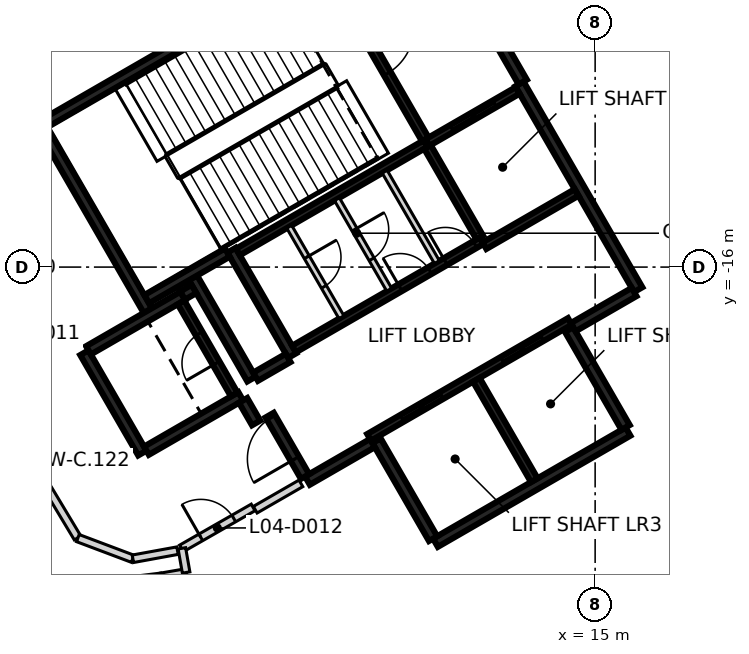
"""IFC4 building model, lengths in metres.
Left out: names, types, materials, properties, quantities, classifications, styles, units other than length and angle.
Written with IfcOpenShell. Run it as: python <this file> out.ifc"""

import sys

from ifc_helpers import new_model, si_unit, direction, frame, frame_2d, origin, place, context, subcontext, project, spatial, rectangle, extrude, element, fill, save


model = new_model("IFC4")
c1 = context("Model", 3, precision=1e-05, world=origin(), true_north=direction((0.0, 1.0)))
c2 = subcontext(c1, "Body", "Model", "MODEL_VIEW")
j1 = project(units=[si_unit("LENGTHUNIT", "METRE"), si_unit("PLANEANGLEUNIT", "RADIAN")], contexts=[c1])
p1 = place(None, origin())
s1 = spatial("IfcSite", under=j1, at=p1, CompositionType="ELEMENT")
p2 = place(p1, origin())
s2 = spatial("IfcBuilding", under=s1, at=p2, CompositionType="ELEMENT")
p3 = place(p2, frame((0.0, 0.0, 24.5)))
s3 = spatial("IfcBuildingStorey", under=s2, at=p3, CompositionType="ELEMENT", Elevation=24.5)
p4 = place(p3, frame((0.417, -12.273, 0.0), z_axis=(0.0, 0.0, 1.0), x_axis=(0.866021906294, 0.500006057782, 0.0)))
e1 = element("IfcWall", 1, at=p4, inside=s3, PredefinedType="SHEAR", context=c2, shape_type="SweptSolid", body=[
    extrude(rectangle(XDim=11.55, YDim=0.25, at=frame_2d((5.775, 0.0))), origin(), (0.0, 0.0, 1.0), 4.6),
])
p5 = place(p4, frame((10.025, 0.0, 0.0)))
e2 = element("IfcOpeningElement", 2, at=p5, cuts=e1, PredefinedType="OPENING", context=c2, shape_type="SweptSolid", body=[
    extrude(rectangle(XDim=1.2, YDim=2.1, at=frame_2d((0.6, 1.05))), frame((0.0, 0.135, 0.0), z_axis=(0.0, -1.0, 0.0), x_axis=(1.0, 0.0, 0.0)), (0.0, 0.0, 1.0), 0.27),
])
p6 = place(p4, frame((8.725, 0.0, 0.0)))
e3 = element("IfcOpeningElement", 3, at=p6, cuts=e1, PredefinedType="OPENING", context=c2, shape_type="SweptSolid", body=[
    extrude(rectangle(XDim=1.2, YDim=2.1, at=frame_2d((0.6, 1.05))), frame((0.0, 0.135, 0.0), z_axis=(0.0, -1.0, 0.0), x_axis=(1.0, 0.0, 0.0)), (0.0, 0.0, 1.0), 0.27),
])
p7 = place(p3, frame((13.008, -11.181, 0.0), z_axis=(0.0, 0.0, 1.0), x_axis=(0.500004234368, -0.866022959057, 0.0)))
e4 = element("IfcWall", 4, at=p7, inside=s3, PredefinedType="SHEAR", context=c2, shape_type="SweptSolid", body=[
    extrude(rectangle(XDim=6.25, YDim=0.25, at=frame_2d((3.125, 0.0))), origin(), (0.0, 0.0, 1.0), 4.6),
])
p8 = place(p3, frame((15.865, -20.328, 0.0), z_axis=(0.0, 0.0, 1.0), x_axis=(-0.86602852612, -0.499994591916, 0.0)))
e5 = element("IfcWall", 5, at=p8, inside=s3, PredefinedType="SHEAR", context=c2, shape_type="SweptSolid", body=[
    extrude(rectangle(XDim=5.85, YDim=0.25, at=frame_2d((2.925, 0.0))), origin(), (0.0, 0.0, 1.0), 4.6),
])
p9 = place(p3, frame((3.235, -17.153, 0.0), z_axis=(0.0, 0.0, 1.0), x_axis=(-0.500008851346, 0.866020293397, 0.0)))
e6 = element("IfcWall", 6, at=p9, inside=s3, PredefinedType="SHEAR", context=c2, shape_type="SweptSolid", body=[
    extrude(rectangle(XDim=5.51, YDim=0.25, at=frame_2d((2.755, 0.0))), origin(), (0.0, 0.0, 1.0), 4.6),
])
p10 = place(p3, frame((10.483, -6.606, 0.0), z_axis=(0.0, 0.0, 1.0), x_axis=(0.49999885962, -0.866026062182, 0.0)))
e7 = element("IfcWall", 7, at=p10, inside=s3, PredefinedType="SHEAR", context=c2, shape_type="SweptSolid", body=[
    extrude(rectangle(XDim=5.225, YDim=0.25, at=frame_2d((2.612, 0.0))), origin(), (0.0, 0.0, 1.0), 4.6),
])
p11 = place(p10, frame((1.95, 0.0, 0.0)))
e8 = element("IfcOpeningElement", 8, at=p11, cuts=e7, PredefinedType="OPENING", context=c2, shape_type="SweptSolid", body=[
    extrude(rectangle(XDim=1.2, YDim=2.1, at=frame_2d((0.6, 1.05))), frame((0.0, 0.135, 0.0), z_axis=(0.0, -1.0, 0.0), x_axis=(1.0, 0.0, 0.0)), (0.0, 0.0, 1.0), 0.27),
])
p12 = place(p3, frame((7.031, -18.327, 0.0), z_axis=(0.0, 0.0, 1.0), x_axis=(-0.499971222258, 0.866042017984, 0.0)))
e9 = element("IfcWall", 9, at=p12, inside=s3, PredefinedType="SHEAR", context=c2, shape_type="SweptSolid", body=[
    extrude(rectangle(XDim=3.2, YDim=0.25, at=frame_2d((1.6, 0.0))), origin(), (0.0, 0.0, 1.0), 4.6),
])
for number, where, z_axis, x_axis in (
    (10, (14.315, -17.644, 0.0), (0.0, 0.0, 1.0), (0.5, -0.866, 0.0)),
    (11, (10.736, -23.145, 0.0), (0.0, 0.0, 1.0), (-0.5, 0.866, 0.0)),
):
    element("IfcWall", number, at=place(p3, frame(where, z_axis=z_axis, x_axis=x_axis)), inside=s3, PredefinedType="SHEAR", context=c2, shape_type="SweptSolid", body=[
        extrude(rectangle(XDim=2.974, YDim=0.25, at=frame_2d((1.487, 0.0))), origin(), (0.0, 0.0, 1.0), 4.6),
    ])
p13 = place(p3, frame((3.085, -20.894, 0.0), z_axis=(0.0, 0.0, 1.0), x_axis=(-0.499978833458, 0.866037623948, 0.0)))
e12 = element("IfcWall", 12, at=p13, inside=s3, PredefinedType="SHEAR", context=c2, shape_type="SweptSolid", body=[
    extrude(rectangle(XDim=3.05, YDim=0.25, at=frame_2d((1.525, 0.0))), origin(), (0.0, 0.0, 1.0), 4.6),
])
p14 = place(p3, frame((1.669, -18.19, 0.0), z_axis=(0.0, 0.0, 1.0), x_axis=(0.866042235819, 0.499970844928, 0.0)))
e13 = element("IfcWall", 13, at=p14, inside=s3, PredefinedType="SHEAR", context=c2, shape_type="SweptSolid", body=[
    extrude(rectangle(XDim=2.865, YDim=0.25, at=frame_2d((1.432, 0.0))), origin(), (0.0, 0.0, 1.0), 4.6),
])
p15 = place(p3, frame((5.675, -19.399, 0.0), z_axis=(0.0, 0.0, 1.0), x_axis=(-0.866026637627, -0.499997862916, 0.0)))
e14 = element("IfcWall", 14, at=p15, inside=s3, PredefinedType="SHEAR", context=c2, shape_type="SweptSolid", body=[
    extrude(rectangle(XDim=2.865, YDim=0.25, at=frame_2d((1.432, 0.0))), origin(), (0.0, 0.0, 1.0), 4.6),
])
p16 = place(p3, frame((4.414, -16.276, 0.0), z_axis=(0.0, 0.0, 1.0), x_axis=(0.500003324108, -0.866023484601, 0.0)))
e15 = element("IfcWall", 15, at=p16, inside=s3, PredefinedType="SHEAR", context=c2, shape_type="SweptSolid", body=[
    extrude(rectangle(XDim=3.085, YDim=0.25, at=frame_2d((1.542, 0.0))), origin(), (0.0, 0.0, 1.0), 4.6),
])
p17 = place(p3, frame((5.322, -15.619, 0.0), z_axis=(0.0, 0.0, 1.0), x_axis=(-0.866026229868, -0.499998569178, 0.0)))
e16 = element("IfcWall", 16, at=p17, inside=s3, PredefinedType="SHEAR", context=c2, shape_type="SweptSolid", body=[
    extrude(rectangle(XDim=2.449, YDim=0.25, at=frame_2d((1.225, 0.0))), origin(), (0.0, 0.0, 1.0), 4.6),
])
p18 = place(p3, frame((9.14, -20.631, 0.0), z_axis=(0.0, 0.0, 1.0), x_axis=(-0.866043531843, -0.499968599967, 0.0)))
e17 = element("IfcWall", 17, at=p18, inside=s3, PredefinedType="SHEAR", context=c2, shape_type="SweptSolid", body=[
    extrude(rectangle(XDim=1.975, YDim=0.25, at=frame_2d((0.987, 0.0))), origin(), (0.0, 0.0, 1.0), 4.6),
])
p19 = place(p3, frame((16.025, -16.656, 0.0), z_axis=(0.0, 0.0, 1.0), x_axis=(-0.866016279763, -0.500015802937, 0.0)))
e18 = element("IfcWall", 18, at=p19, inside=s3, PredefinedType="SHEAR", context=c2, shape_type="SweptSolid", body=[
    extrude(rectangle(XDim=1.849, YDim=0.25, at=frame_2d((0.925, 0.0))), origin(), (0.0, 0.0, 1.0), 4.6),
])
p20 = place(p3, frame((7.367, -21.51, 0.0), z_axis=(0.0, 0.0, 1.0), x_axis=(-0.499983108224, 0.866035156036, 0.0)))
e19 = element("IfcWall", 19, at=p20, inside=s3, PredefinedType="SHEAR", context=c2, shape_type="SweptSolid", body=[
    extrude(rectangle(XDim=1.865, YDim=0.25, at=frame_2d((0.932, 0.0))), origin(), (0.0, 0.0, 1.0), 4.6),
])
p21 = place(p20, frame((0.535, 0.0, 0.0)))
e20 = element("IfcOpeningElement", 20, at=p21, cuts=e19, PredefinedType="OPENING", context=c2, shape_type="SweptSolid", body=[
    extrude(rectangle(XDim=1.25, YDim=2.1, at=frame_2d((0.625, 1.05))), frame((0.0, 0.135, 0.0), z_axis=(0.0, -1.0, 0.0), x_axis=(1.0, 0.0, 0.0)), (0.0, 0.0, 1.0), 0.27),
])
p22 = place(p3, frame((6.065, -18.885, 0.0), z_axis=(0.0, 0.0, 1.0), x_axis=(0.866017078145, 0.500014420154, 0.0)))
e21 = element("IfcWall", 21, at=p22, inside=s3, PredefinedType="SHEAR", context=c2, shape_type="SweptSolid", body=[
    extrude(rectangle(XDim=0.989, YDim=0.25, at=frame_2d((0.495, 0.0))), origin(), (0.0, 0.0, 1.0), 4.6),
])
p23 = place(p3, frame((6.08, -20.1, 0.0), z_axis=(0.0, 0.0, 1.0), x_axis=(-0.500051773299, 0.865995510393, 0.0)))
e22 = element("IfcWall", 22, at=p23, inside=s3, PredefinedType="SHEAR", context=c2, shape_type="SweptSolid", body=[
    extrude(rectangle(XDim=0.685, YDim=0.25, at=frame_2d((0.342, 0.0))), origin(), (0.0, 0.0, 1.0), 4.6),
])
p24 = place(p3, frame((4.145, -16.749, 0.0), z_axis=(0.0, 0.0, 1.0), x_axis=(0.866185586049, 0.49972245349, 0.0)))
e23 = element("IfcWall", 23, at=p24, inside=s3, PredefinedType="SHEAR", context=c2, shape_type="SweptSolid", body=[
    extrude(rectangle(XDim=0.344, YDim=0.25, at=frame_2d((0.172, 0.0))), origin(), (0.0, 0.0, 1.0), 4.6),
])
p25 = place(p3, frame((9.052, -20.48, 0.0), z_axis=(0.0, 0.0, 1.0), x_axis=(0.866030299012, 0.499991521122, 0.0)))
e24 = element("IfcWall", 24, at=p25, inside=s3, PredefinedType="SHEAR", context=c2, shape_type="SweptSolid", body=[
    extrude(rectangle(XDim=6.1, YDim=0.2, at=frame_2d((3.05, 0.0))), origin(), (0.0, 0.0, 1.0), 4.6),
])
p26 = place(p25, frame((1.0, 0.0, 0.0)))
e25 = element("IfcOpeningElement", 25, at=p26, cuts=e24, PredefinedType="OPENING", context=c2, shape_type="SweptSolid", body=[
    extrude(rectangle(XDim=1.2, YDim=2.1, at=frame_2d((0.6, 1.05))), frame((0.0, 0.11, 0.0), z_axis=(0.0, -1.0, 0.0), x_axis=(1.0, 0.0, 0.0)), (0.0, 0.0, 1.0), 0.22),
])
p27 = place(p25, frame((4.05, 0.0, 0.0)))
e26 = element("IfcOpeningElement", 26, at=p27, cuts=e24, PredefinedType="OPENING", context=c2, shape_type="SweptSolid", body=[
    extrude(rectangle(XDim=1.2, YDim=2.1, at=frame_2d((0.6, 1.05))), frame((0.0, 0.11, 0.0), z_axis=(0.0, -1.0, 0.0), x_axis=(1.0, 0.0, 0.0)), (0.0, 0.0, 1.0), 0.22),
])
p28 = place(p3, frame((10.538, -12.752, 0.0), z_axis=(0.0, 0.0, 1.0), x_axis=(-0.866038630372, -0.499977090179, 0.0)))
e27 = element("IfcWall", 27, at=p28, inside=s3, PredefinedType="SHEAR", context=c2, shape_type="SweptSolid", body=[
    extrude(rectangle(XDim=5.699, YDim=0.2, at=frame_2d((2.85, 0.0))), origin(), (0.0, 0.0, 1.0), 4.6),
])
p29 = place(p3, frame((7.077, -18.156, 0.0), z_axis=(0.0, 0.0, 1.0), x_axis=(0.866038630372, 0.499977090179, 0.0)))
e28 = element("IfcWall", 28, at=p29, inside=s3, PredefinedType="SHEAR", context=c2, shape_type="SweptSolid", body=[
    extrude(rectangle(XDim=5.699, YDim=0.2, at=frame_2d((2.85, 0.0))), origin(), (0.0, 0.0, 1.0), 4.6),
])
p30 = place(p29, frame((3.224, 0.0, 0.0)))
e29 = element("IfcOpeningElement", 29, at=p30, cuts=e28, PredefinedType="OPENING", context=c2, shape_type="SweptSolid", body=[
    extrude(rectangle(XDim=0.9, YDim=2.1, at=frame_2d((0.45, 1.05))), frame((0.0, 0.11, 0.0), z_axis=(0.0, -1.0, 0.0), x_axis=(1.0, 0.0, 0.0)), (0.0, 0.0, 1.0), 0.22),
])
p31 = place(p29, frame((4.599, 0.0, 0.0)))
e30 = element("IfcOpeningElement", 30, at=p31, cuts=e28, PredefinedType="OPENING", context=c2, shape_type="SweptSolid", body=[
    extrude(rectangle(XDim=0.9, YDim=2.1, at=frame_2d((0.45, 1.05))), frame((0.0, 0.11, 0.0), z_axis=(0.0, -1.0, 0.0), x_axis=(1.0, 0.0, 0.0)), (0.0, 0.0, 1.0), 0.22),
])
p32 = place(p3, frame((7.906, -8.094, 0.0), z_axis=(0.0, 0.0, 1.0), x_axis=(0.500024287448, -0.866011380966, 0.0)))
e31 = element("IfcWall", 31, at=p32, inside=s3, PredefinedType="SHEAR", context=c2, shape_type="SweptSolid", body=[
    extrude(rectangle(XDim=5.251, YDim=0.2, at=frame_2d((2.625, 0.0))), origin(), (0.0, 0.0, 1.0), 4.6),
])
p33 = place(p32, frame((1.849, 0.0, 0.0)))
e32 = element("IfcOpeningElement", 32, at=p33, cuts=e31, PredefinedType="OPENING", context=c2, shape_type="SweptSolid", body=[
    extrude(rectangle(XDim=1.4, YDim=2.1, at=frame_2d((0.7, 1.05))), frame((0.0, 0.11, 0.0), z_axis=(0.0, -1.0, 0.0), x_axis=(1.0, 0.0, 0.0)), (0.0, 0.0, 1.0), 0.22),
])
p34 = place(p3, frame((11.875, -18.967, 0.0), z_axis=(0.0, 0.0, 1.0), x_axis=(0.49998131003, -0.866036194175, 0.0)))
e33 = element("IfcWall", 33, at=p34, inside=s3, PredefinedType="SHEAR", context=c2, shape_type="SweptSolid", body=[
    extrude(rectangle(XDim=3.048, YDim=0.2, at=frame_2d((1.524, 0.0))), origin(), (0.0, 0.0, 1.0), 4.6),
])
p35 = place(p3, frame((5.503, -19.352, 0.0), z_axis=(0.0, 0.0, 1.0), x_axis=(-0.499986818241, 0.866033014143, 0.0)))
e34 = element("IfcWall", 34, at=p35, inside=s3, PredefinedType="SHEAR", context=c2, shape_type="SweptSolid", body=[
    extrude(rectangle(XDim=2.798, YDim=0.2, at=frame_2d((1.399, 0.0))), origin(), (0.0, 0.0, 1.0), 4.6),
])
p36 = place(p35, frame((0.949, 0.0, 0.0)))
e35 = element("IfcOpeningElement", 35, at=p36, cuts=e34, PredefinedType="OPENING", context=c2, shape_type="SweptSolid", body=[
    extrude(rectangle(XDim=0.9, YDim=2.1, at=frame_2d((0.45, 1.05))), frame((0.0, 0.11, 0.0), z_axis=(0.0, -1.0, 0.0), x_axis=(1.0, 0.0, 0.0)), (0.0, 0.0, 1.0), 0.22),
])
p37 = place(p3, frame((11.963, -15.22, 0.0), z_axis=(0.0, 0.0, 1.0), x_axis=(-0.500034990121, 0.866005201286, 0.0)))
e36 = element("IfcWall", 36, at=p37, inside=s3, PredefinedType="SHEAR", context=c2, shape_type="SweptSolid", body=[
    extrude(rectangle(XDim=2.75, YDim=0.2, at=frame_2d((1.375, 0.0))), origin(), (0.0, 0.0, 1.0), 4.6),
])
p38 = place(p3, frame((10.587, -12.723, 0.0), z_axis=(0.0, 0.0, 1.0), x_axis=(0.866037306777, 0.499979382845, 0.0)))
e37 = element("IfcWall", 37, at=p38, inside=s3, PredefinedType="SHEAR", context=c2, shape_type="SweptSolid", body=[
    extrude(rectangle(XDim=2.742, YDim=0.2, at=frame_2d((1.371, 0.0))), origin(), (0.0, 0.0, 1.0), 4.6),
])
p39 = place(p38, frame((0.743, 0.0, 0.0)))
e38 = element("IfcOpeningElement", 38, at=p39, cuts=e37, PredefinedType="OPENING", context=c2, shape_type="SweptSolid", body=[
    extrude(rectangle(XDim=1.3, YDim=2.1, at=frame_2d((0.65, 1.05))), frame((0.0, 0.11, 0.0), z_axis=(0.0, -1.0, 0.0), x_axis=(1.0, 0.0, 0.0)), (0.0, 0.0, 1.0), 0.22),
])
p40 = place(p3, frame((14.512, -14.037, 0.0), z_axis=(0.0, 0.0, 1.0), x_axis=(-0.866044696403, -0.499966582715, 0.0)))
e39 = element("IfcWall", 39, at=p40, inside=s3, PredefinedType="SHEAR", context=c2, shape_type="SweptSolid", body=[
    extrude(rectangle(XDim=2.799, YDim=0.2, at=frame_2d((1.399, 0.0))), origin(), (0.0, 0.0, 1.0), 4.6),
])
p41 = place(p3, frame((8.207, -14.214, 0.0), z_axis=(0.0, 0.0, 1.0), x_axis=(0.50002746344, -0.86600954718, 0.0)))
e40 = element("IfcWall", 40, at=p41, inside=s3, PredefinedType="PARTITIONING", context=c2, shape_type="SweptSolid", body=[
    extrude(rectangle(XDim=2.748, YDim=0.15, at=frame_2d((1.374, 0.0))), origin(), (0.0, 0.0, 1.0), 4.6),
])
p42 = place(p41, frame((0.924, 0.0, 0.0)))
e41 = element("IfcOpeningElement", 41, at=p42, cuts=e40, PredefinedType="OPENING", context=c2, shape_type="SweptSolid", body=[
    extrude(rectangle(XDim=0.9, YDim=2.1, at=frame_2d((0.45, 1.05))), frame((0.0, 0.085, 0.0), z_axis=(0.0, -1.0, 0.0), x_axis=(1.0, 0.0, 0.0)), (0.0, 0.0, 1.0), 0.17),
])
p43 = place(p3, frame((9.462, -13.489, 0.0), z_axis=(0.0, 0.0, 1.0), x_axis=(0.499988999718, -0.866031754707, 0.0)))
e42 = element("IfcWall", 42, at=p43, inside=s3, PredefinedType="PARTITIONING", context=c2, shape_type="SweptSolid", body=[
    extrude(rectangle(XDim=2.749, YDim=0.15, at=frame_2d((1.374, 0.0))), origin(), (0.0, 0.0, 1.0), 4.6),
])
p44 = place(p3, frame((6.951, -14.939, 0.0), z_axis=(0.0, 0.0, 1.0), x_axis=(0.499988999718, -0.866031754707, 0.0)))
e43 = element("IfcWall", 43, at=p44, inside=s3, PredefinedType="PARTITIONING", context=c2, shape_type="SweptSolid", body=[
    extrude(rectangle(XDim=2.749, YDim=0.15, at=frame_2d((1.374, 0.0))), origin(), (0.0, 0.0, 1.0), 4.6),
])
p45 = place(p44, frame((0.924, 0.0, 0.0)))
e44 = element("IfcOpeningElement", 44, at=p45, cuts=e43, PredefinedType="OPENING", context=c2, shape_type="SweptSolid", body=[
    extrude(rectangle(XDim=0.9, YDim=2.1, at=frame_2d((0.45, 1.05))), frame((0.0, 0.085, 0.0), z_axis=(0.0, -1.0, 0.0), x_axis=(1.0, 0.0, 0.0)), (0.0, 0.0, 1.0), 0.17),
])
p46 = place(p3, frame((-1.047, -19.086, 0.0), z_axis=(0.0, 0.0, 1.0), x_axis=(0.515211359032, -0.857063157255, 0.0)))
e45 = element("IfcWall", 45, at=p46, inside=s3, PredefinedType="PARTITIONING", context=c2, shape_type="SweptSolid", body=[
    extrude(rectangle(XDim=4.715, YDim=0.2, at=frame_2d((2.357, 0.0))), origin(), (0.0, 0.0, 1.0), 4.6),
])
p47 = place(p3, frame((1.389, -23.131, 0.0), z_axis=(0.0, 0.0, 1.0), x_axis=(0.935814533732, -0.352492777879, 0.0)))
e46 = element("IfcWall", 46, at=p47, inside=s3, PredefinedType="PARTITIONING", context=c2, shape_type="SweptSolid", body=[
    extrude(rectangle(XDim=1.543, YDim=0.2, at=frame_2d((0.771, 0.0))), origin(), (0.0, 0.0, 1.0), 4.6),
])
p48 = place(p3, frame((2.837, -23.675, 0.0), z_axis=(0.0, 0.0, 1.0), x_axis=(0.983774851332, 0.179407474447, 0.0)))
e47 = element("IfcWall", 47, at=p48, inside=s3, PredefinedType="PARTITIONING", context=c2, shape_type="SweptSolid", body=[
    extrude(rectangle(XDim=1.193, YDim=0.2, at=frame_2d((0.597, 0.0))), origin(), (0.0, 0.0, 1.0), 4.6),
])
p49 = place(p3, frame((4.116, -23.403, 0.0), z_axis=(0.0, 0.0, 1.0), x_axis=(0.867855523063, 0.49681665742, 0.0)))
e48 = element("IfcWall", 48, at=p49, inside=s3, PredefinedType="PARTITIONING", context=c2, shape_type="SweptSolid", body=[
    extrude(rectangle(XDim=2.172, YDim=0.2, at=frame_2d((1.086, 0.0))), origin(), (0.0, 0.0, 1.0), 4.6),
])
p50 = place(p49, frame((0.586, 0.0, 0.0)))
e49 = element("IfcOpeningElement", 49, at=p50, cuts=e48, PredefinedType="OPENING", context=c2, shape_type="SweptSolid", body=[
    extrude(rectangle(XDim=1.0, YDim=2.1, at=frame_2d((0.5, 1.05))), frame((0.0, 0.11, 0.0), z_axis=(0.0, -1.0, 0.0), x_axis=(1.0, 0.0, 0.0)), (0.0, 0.0, 1.0), 0.22),
])
p51 = place(p3, frame((6.056, -22.384, 0.0), z_axis=(0.0, 0.0, 1.0), x_axis=(0.866276386163, 0.499565033581, 0.0)))
e50 = element("IfcWall", 50, at=p51, inside=s3, PredefinedType="PARTITIONING", context=c2, shape_type="SweptSolid", body=[
    extrude(rectangle(XDim=1.387, YDim=0.2, at=frame_2d((0.694, 0.0))), origin(), (0.0, 0.0, 1.0), 4.6),
])
p52 = place(p3, frame((2.393, -24.296, 0.0), z_axis=(0.0, 0.0, 1.0), x_axis=(0.992545185506, 0.12187721169, 0.0)))
e51 = element("IfcWall", 51, at=p52, inside=s3, PredefinedType="PARTITIONING", context=c2, shape_type="SweptSolid", body=[
    extrude(rectangle(XDim=1.198, YDim=0.2, at=frame_2d((0.599, 0.0))), origin(), (0.0, 0.0, 1.0), 4.6),
])
p53 = place(p3, frame((3.582, -24.15, 0.0), z_axis=(0.0, 0.0, 1.0), x_axis=(0.985230586733, 0.171232855975, 0.0)))
e52 = element("IfcWall", 52, at=p53, inside=s3, PredefinedType="PARTITIONING", context=c2, shape_type="SweptSolid", body=[
    extrude(rectangle(XDim=0.666, YDim=0.2, at=frame_2d((0.333, 0.0))), origin(), (0.0, 0.0, 1.0), 4.6),
])
p54 = place(p3, frame((4.126, -23.4, 0.0), z_axis=(0.0, 0.0, 1.0), x_axis=(0.173526526228, -0.984829195696, 0.0)))
e53 = element("IfcWall", 53, at=p54, inside=s3, PredefinedType="PARTITIONING", context=c2, shape_type="SweptSolid", body=[
    extrude(rectangle(XDim=0.646, YDim=0.2, at=frame_2d((0.323, 0.0))), origin(), (0.0, 0.0, 1.0), 4.6),
])
p55 = place(p39, origin())
e54 = element("IfcDoor", 54, at=p55, inside=s3, OperationType="SLIDING_TO_RIGHT", PredefinedType="DOOR", context=c2, shape_type="SweptSolid", body=[
    extrude(rectangle(XDim=1.3, YDim=2.1, at=frame_2d((0.65, 1.05))), frame((0.0, 0.025, 0.0), z_axis=(0.0, -1.0, 0.0), x_axis=(1.0, 0.0, 0.0)), (0.0, 0.0, 1.0), 0.05),
])
fill(e38, e54)
p56 = place(p26, origin())
e55 = element("IfcDoor", 55, at=p56, inside=s3, OperationType="DOUBLE_DOOR_SLIDING", PredefinedType="DOOR", context=c2, shape_type="SweptSolid", body=[
    extrude(rectangle(XDim=1.2, YDim=2.1, at=frame_2d((0.6, 1.05))), frame((0.0, 0.025, 0.0), z_axis=(0.0, -1.0, 0.0), x_axis=(1.0, 0.0, 0.0)), (0.0, 0.0, 1.0), 0.05),
])
fill(e25, e55)
p57 = place(p27, origin())
e56 = element("IfcDoor", 56, at=p57, inside=s3, OperationType="DOUBLE_DOOR_SLIDING", PredefinedType="DOOR", context=c2, shape_type="SweptSolid", body=[
    extrude(rectangle(XDim=1.2, YDim=2.1, at=frame_2d((0.6, 1.05))), frame((0.0, 0.025, 0.0), z_axis=(0.0, -1.0, 0.0), x_axis=(1.0, 0.0, 0.0)), (0.0, 0.0, 1.0), 0.05),
])
fill(e26, e56)
p58 = place(p21, origin())
e57 = element("IfcDoor", 57, at=p58, inside=s3, OperationType="SINGLE_SWING_LEFT", PredefinedType="DOOR", context=c2, shape_type="SweptSolid", body=[
    extrude(rectangle(XDim=1.25, YDim=2.1, at=frame_2d((0.625, 1.05))), frame((0.0, 0.025, 0.0), z_axis=(0.0, -1.0, 0.0), x_axis=(1.0, 0.0, 0.0)), (0.0, 0.0, 1.0), 0.05),
])
fill(e20, e57)
p59 = place(p33, origin())
e58 = element("IfcDoor", 58, at=p59, inside=s3, OperationType="SINGLE_SWING_RIGHT", PredefinedType="DOOR", context=c2, shape_type="SweptSolid", body=[
    extrude(rectangle(XDim=1.4, YDim=2.1, at=frame_2d((0.7, 1.05))), frame((0.0, 0.025, 0.0), z_axis=(0.0, -1.0, 0.0), x_axis=(1.0, 0.0, 0.0)), (0.0, 0.0, 1.0), 0.05),
])
fill(e32, e58)
p60 = place(p30, origin())
e59 = element("IfcDoor", 59, at=p60, inside=s3, OperationType="SINGLE_SWING_LEFT", PredefinedType="DOOR", context=c2, shape_type="SweptSolid", body=[
    extrude(rectangle(XDim=0.9, YDim=2.1, at=frame_2d((0.45, 1.05))), frame((0.0, 0.025, 0.0), z_axis=(0.0, -1.0, 0.0), x_axis=(1.0, 0.0, 0.0)), (0.0, 0.0, 1.0), 0.05),
])
fill(e29, e59)
p61 = place(p31, origin())
e60 = element("IfcDoor", 60, at=p61, inside=s3, OperationType="SINGLE_SWING_RIGHT", PredefinedType="DOOR", context=c2, shape_type="SweptSolid", body=[
    extrude(rectangle(XDim=0.9, YDim=2.1, at=frame_2d((0.45, 1.05))), frame((0.0, 0.025, 0.0), z_axis=(0.0, -1.0, 0.0), x_axis=(1.0, 0.0, 0.0)), (0.0, 0.0, 1.0), 0.05),
])
fill(e30, e60)
p62 = place(p36, origin())
e61 = element("IfcDoor", 61, at=p62, inside=s3, OperationType="SINGLE_SWING_LEFT", PredefinedType="DOOR", context=c2, shape_type="SweptSolid", body=[
    extrude(rectangle(XDim=0.9, YDim=2.1, at=frame_2d((0.45, 1.05))), frame((0.0, 0.025, 0.0), z_axis=(0.0, -1.0, 0.0), x_axis=(1.0, 0.0, 0.0)), (0.0, 0.0, 1.0), 0.05),
])
fill(e35, e61)
p63 = place(p42, origin())
e62 = element("IfcDoor", 62, at=p63, inside=s3, OperationType="SINGLE_SWING_RIGHT", PredefinedType="DOOR", context=c2, shape_type="SweptSolid", body=[
    extrude(rectangle(XDim=0.9, YDim=2.1, at=frame_2d((0.45, 1.05))), frame((0.0, 0.025, 0.0), z_axis=(0.0, -1.0, 0.0), x_axis=(1.0, 0.0, 0.0)), (0.0, 0.0, 1.0), 0.05),
])
fill(e41, e62)
p64 = place(p45, origin())
e63 = element("IfcDoor", 63, at=p64, inside=s3, OperationType="SINGLE_SWING_LEFT", PredefinedType="DOOR", context=c2, shape_type="SweptSolid", body=[
    extrude(rectangle(XDim=0.9, YDim=2.1, at=frame_2d((0.45, 1.05))), frame((0.0, 0.025, 0.0), z_axis=(0.0, -1.0, 0.0), x_axis=(1.0, 0.0, 0.0)), (0.0, 0.0, 1.0), 0.05),
])
fill(e44, e63)
p65 = place(p50, frame((1.0, 0.0, 0.0), z_axis=(0.0, 0.0, 1.0), x_axis=(-1.0, 0.0, 0.0)))
e64 = element("IfcDoor", 64, at=p65, inside=s3, OperationType="SINGLE_SWING_LEFT", PredefinedType="DOOR", context=c2, shape_type="SweptSolid", body=[
    extrude(rectangle(XDim=1.0, YDim=2.1, at=frame_2d((0.5, 1.05))), frame((0.0, 0.025, 0.0), z_axis=(0.0, -1.0, 0.0), x_axis=(1.0, 0.0, 0.0)), (0.0, 0.0, 1.0), 0.05),
])
fill(e49, e64)
save(model, sys.argv[1])
